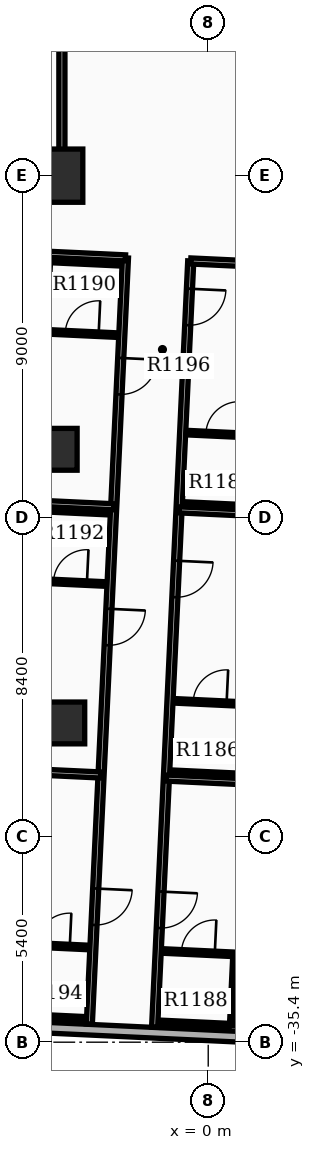
"""IFC4 building model, lengths in metres.
Left out: names, types, materials, properties, quantities, classifications, styles, units other than length and angle.
Written with IfcOpenShell. Run it as: python <this file> out.ifc"""

import sys

from ifc_helpers import new_model, si_unit, direction, frame, frame_2d, origin, origin_2d, place, context, subcontext, project, spatial, rectangle, extrude, element, fill, save


model = new_model("IFC4")
c1 = context("Model", 3, precision=1e-05, world=origin(), true_north=direction((0.0, 1.0)))
c2 = subcontext(c1, "Body", "Model", "MODEL_VIEW")
j1 = project(units=[si_unit("LENGTHUNIT", "METRE"), si_unit("PLANEANGLEUNIT", "RADIAN")], contexts=[c1])
p1 = place(None, origin())
s1 = spatial("IfcSite", under=j1, at=p1, CompositionType="ELEMENT")
p2 = place(p1, origin())
s2 = spatial("IfcBuilding", under=s1, at=p2, CompositionType="ELEMENT")
p3 = place(p2, frame((0.0, 0.0, 75.6)))
s3 = spatial("IfcBuildingStorey", under=s2, at=p3, CompositionType="ELEMENT", Elevation=75.6)
p4 = place(p3, frame((-4.0, -12.6, 0.0), z_axis=(0.0, 0.0, 1.0), x_axis=(1.0, 0.0, 0.0)))
e1 = element("IfcColumn", 1, at=p4, inside=s3, PredefinedType="COLUMN", context=c2, shape_type="SweptSolid", body=[
    extrude(rectangle(XDim=1.4, YDim=1.4, at=origin_2d()), origin(), (0.0, 0.0, 1.0), 3.9),
])
for number, where, z_axis, x_axis in (
    (2, (-4.0, -19.8, 0.0), (0.0, 0.0, 1.0), (1.0, 0.0, 0.0)),
    (3, (-3.8, -27.0, 0.0), (0.0, 0.0, 1.0), (1.0, 0.0, 0.0)),
):
    element("IfcColumn", number, at=place(p3, frame(where, z_axis=z_axis, x_axis=x_axis)), inside=s3, PredefinedType="COLUMN", context=c2, shape_type="SweptSolid", body=[
        extrude(rectangle(XDim=1.1, YDim=1.1, at=origin_2d()), origin(), (0.0, 0.0, 1.0), 3.9),
    ])
p5 = place(p3, frame((-8.51, -34.818, 0.0), z_axis=(0.0, 0.0, 1.0), x_axis=(0.998890092147, -0.047101845086, 0.0)))
e4 = element("IfcWall", 4, at=p5, inside=s3, PredefinedType="STANDARD", context=c2, shape_type="SweptSolid", body=[
    extrude(rectangle(XDim=13.72, YDim=0.28, at=frame_2d((6.86, 0.0))), origin(), (0.0, 0.0, 1.0), 2.91),
])
p6 = place(p5, frame((0.85, 0.0, 0.85)))
e5 = element("IfcOpeningElement", 5, at=p6, cuts=e4, PredefinedType="OPENING", context=c2, shape_type="SweptSolid", body=[
    extrude(rectangle(XDim=1.0, YDim=1.5, at=frame_2d((0.5, 0.75))), frame((0.0, 0.15, 0.0), z_axis=(0.0, -1.0, 0.0), x_axis=(1.0, 0.0, 0.0)), (0.0, 0.0, 1.0), 0.3),
])
p7 = place(p3, frame((-12.4, -13.15, 0.0), z_axis=(0.0, 0.0, 1.0), x_axis=(1.0, 0.0, 0.0)))
e6 = element("IfcWall", 6, at=p7, inside=s3, PredefinedType="PARTITIONING", context=c2, shape_type="SweptSolid", body=[
    extrude(rectangle(XDim=8.55, YDim=0.16, at=frame_2d((4.275, 0.0))), origin(), (0.0, 0.0, 1.0), 2.9),
])
p8 = place(p3, frame((-3.85, -13.065, 0.0), z_axis=(0.0, 0.0, 1.0), x_axis=(0.0, 1.0, 0.0)))
e7 = element("IfcWall", 7, at=p8, inside=s3, PredefinedType="PARTITIONING", context=c2, shape_type="SweptSolid", body=[
    extrude(rectangle(XDim=3.93, YDim=0.16, at=frame_2d((1.965, 0.0))), origin(), (0.0, 0.0, 1.0), 2.9),
])
p9 = place(p3, frame((-0.46, -14.845, 0.0), z_axis=(0.0, 0.0, 1.0), x_axis=(-0.047105352469, -0.998889926753, 0.0)))
e8 = element("IfcWall", 8, at=p9, inside=s3, PredefinedType="PARTITIONING", context=c2, shape_type="SweptSolid", body=[
    extrude(rectangle(XDim=20.182, YDim=0.16, at=frame_2d((10.091, 0.0))), origin(), (0.0, 0.0, 1.0), 2.9),
])
p10 = place(p9, frame((0.731, 0.0, 0.0)))
e9 = element("IfcOpeningElement", 9, at=p10, cuts=e8, PredefinedType="OPENING", context=c2, shape_type="SweptSolid", body=[
    extrude(rectangle(XDim=0.96, YDim=2.15, at=frame_2d((0.48, 1.075))), frame((0.0, 0.09, 0.0), z_axis=(0.0, -1.0, 0.0), x_axis=(1.0, 0.0, 0.0)), (0.0, 0.0, 1.0), 0.18),
])
p11 = place(p9, frame((7.896, 0.0, 0.0)))
e10 = element("IfcOpeningElement", 10, at=p11, cuts=e8, PredefinedType="OPENING", context=c2, shape_type="SweptSolid", body=[
    extrude(rectangle(XDim=0.96, YDim=2.15, at=frame_2d((0.48, 1.075))), frame((0.0, 0.09, 0.0), z_axis=(0.0, -1.0, 0.0), x_axis=(1.0, 0.0, 0.0)), (0.0, 0.0, 1.0), 0.18),
])
p12 = place(p9, frame((16.611, 0.0, 0.0)))
e11 = element("IfcOpeningElement", 11, at=p12, cuts=e8, PredefinedType="OPENING", context=c2, shape_type="SweptSolid", body=[
    extrude(rectangle(XDim=0.96, YDim=2.15, at=frame_2d((0.48, 1.075))), frame((0.0, 0.09, 0.0), z_axis=(0.0, -1.0, 0.0), x_axis=(1.0, 0.0, 0.0)), (0.0, 0.0, 1.0), 0.18),
])
p13 = place(p3, frame((-0.46, -14.845, 0.0), z_axis=(0.0, 0.0, 1.0), x_axis=(0.998888587821, -0.047133736548, 0.0)))
e12 = element("IfcWall", 12, at=p13, inside=s3, PredefinedType="PARTITIONING", context=c2, shape_type="SweptSolid", body=[
    extrude(rectangle(XDim=6.48, YDim=0.16, at=frame_2d((3.24, 0.0))), origin(), (0.0, 0.0, 1.0), 2.9),
])
p14 = place(p3, frame((-0.769, -21.394, 0.0), z_axis=(0.0, 0.0, 1.0), x_axis=(0.998889408842, -0.047116333717, 0.0)))
e13 = element("IfcWall", 13, at=p14, inside=s3, PredefinedType="PARTITIONING", context=c2, shape_type="SweptSolid", body=[
    extrude(rectangle(XDim=6.332, YDim=0.16, at=frame_2d((3.166, 0.0))), origin(), (0.0, 0.0, 1.0), 2.9),
])
p15 = place(p3, frame((-0.533, -19.362, 0.0), z_axis=(0.0, 0.0, 1.0), x_axis=(0.998891083954, -0.047080807099, 0.0)))
e14 = element("IfcWall", 14, at=p15, inside=s3, PredefinedType="PARTITIONING", context=c2, shape_type="SweptSolid", body=[
    extrude(rectangle(XDim=1.82, YDim=0.12, at=frame_2d((0.91, 0.0))), origin(), (0.0, 0.0, 1.0), 2.9),
])
p16 = place(p15, frame((0.47, 0.0, 0.0)))
e15 = element("IfcOpeningElement", 15, at=p16, cuts=e14, PredefinedType="OPENING", context=c2, shape_type="SweptSolid", body=[
    extrude(rectangle(XDim=0.88, YDim=2.1, at=frame_2d((0.44, 1.05))), frame((0.0, 0.07, 0.0), z_axis=(0.0, -1.0, 0.0), x_axis=(1.0, 0.0, 0.0)), (0.0, 0.0, 1.0), 0.14),
])
p17 = place(p3, frame((-0.621, -21.24, 0.0), z_axis=(0.0, 0.0, 1.0), x_axis=(0.998890786574, -0.047087116047, 0.0)))
e16 = element("IfcWall", 16, at=p17, inside=s3, PredefinedType="PARTITIONING", context=c2, shape_type="SweptSolid", body=[
    extrude(rectangle(XDim=1.82, YDim=0.12, at=frame_2d((0.91, 0.0))), origin(), (0.0, 0.0, 1.0), 2.9),
])
p18 = place(p3, frame((-1.101, -28.451, 0.0), z_axis=(0.0, 0.0, 1.0), x_axis=(0.99889113728, -0.047079675697, 0.0)))
e17 = element("IfcWall", 17, at=p18, inside=s3, PredefinedType="PARTITIONING", context=c2, shape_type="SweptSolid", body=[
    extrude(rectangle(XDim=6.332, YDim=0.16, at=frame_2d((3.166, 0.0))), origin(), (0.0, 0.0, 1.0), 2.9),
])
p19 = place(p3, frame((-0.865, -26.42, 0.0), z_axis=(0.0, 0.0, 1.0), x_axis=(0.998890786574, -0.047087116047, 0.0)))
e18 = element("IfcWall", 18, at=p19, inside=s3, PredefinedType="PARTITIONING", context=c2, shape_type="SweptSolid", body=[
    extrude(rectangle(XDim=1.82, YDim=0.12, at=frame_2d((0.91, 0.0))), origin(), (0.0, 0.0, 1.0), 2.9),
])
p20 = place(p19, frame((0.47, 0.0, 0.0)))
e19 = element("IfcOpeningElement", 19, at=p20, cuts=e18, PredefinedType="OPENING", context=c2, shape_type="SweptSolid", body=[
    extrude(rectangle(XDim=0.88, YDim=2.1, at=frame_2d((0.44, 1.05))), frame((0.0, 0.07, 0.0), z_axis=(0.0, -1.0, 0.0), x_axis=(1.0, 0.0, 0.0)), (0.0, 0.0, 1.0), 0.14),
])
p21 = place(p3, frame((-0.954, -28.298, 0.0), z_axis=(0.0, 0.0, 1.0), x_axis=(0.998891083954, -0.047080807099, 0.0)))
e20 = element("IfcWall", 20, at=p21, inside=s3, PredefinedType="PARTITIONING", context=c2, shape_type="SweptSolid", body=[
    extrude(rectangle(XDim=1.82, YDim=0.12, at=frame_2d((0.91, 0.0))), origin(), (0.0, 0.0, 1.0), 2.9),
])
p22 = place(p3, frame((-1.176, -33.001, 0.0), z_axis=(0.0, 0.0, 1.0), x_axis=(0.998890786574, -0.047087116047, 0.0)))
e21 = element("IfcWall", 21, at=p22, inside=s3, PredefinedType="PARTITIONING", context=c2, shape_type="SweptSolid", body=[
    extrude(rectangle(XDim=1.82, YDim=0.12, at=frame_2d((0.91, 0.0))), origin(), (0.0, 0.0, 1.0), 2.9),
])
p23 = place(p22, frame((0.47, 0.0, 0.0)))
e22 = element("IfcOpeningElement", 22, at=p23, cuts=e21, PredefinedType="OPENING", context=c2, shape_type="SweptSolid", body=[
    extrude(rectangle(XDim=0.88, YDim=2.1, at=frame_2d((0.44, 1.05))), frame((0.0, 0.07, 0.0), z_axis=(0.0, -1.0, 0.0), x_axis=(1.0, 0.0, 0.0)), (0.0, 0.0, 1.0), 0.14),
])
p24 = place(p3, frame((-1.264, -34.879, 0.0), z_axis=(0.0, 0.0, 1.0), x_axis=(0.998890786574, -0.047087116047, 0.0)))
e23 = element("IfcWall", 23, at=p24, inside=s3, PredefinedType="PARTITIONING", context=c2, shape_type="SweptSolid", body=[
    extrude(rectangle(XDim=1.82, YDim=0.12, at=frame_2d((0.91, 0.0))), origin(), (0.0, 0.0, 1.0), 2.9),
])
p25 = place(p3, frame((0.707, -33.09, 0.0), z_axis=(0.0, 0.0, 1.0), x_axis=(-0.047139425368, -0.998888319371, 0.0)))
e24 = element("IfcWall", 24, at=p25, inside=s3, PredefinedType="PARTITIONING", context=c2, shape_type="SweptSolid", body=[
    extrude(rectangle(XDim=1.88, YDim=0.12, at=frame_2d((0.94, 0.0))), origin(), (0.0, 0.0, 1.0), 2.9),
])
p26 = place(p3, frame((-2.178, -14.764, 0.0), z_axis=(0.0, 0.0, 1.0), x_axis=(-0.047105921672, -0.998889899911, 0.0)))
e25 = element("IfcWall", 25, at=p26, inside=s3, PredefinedType="PARTITIONING", context=c2, shape_type="SweptSolid", body=[
    extrude(rectangle(XDim=20.182, YDim=0.16, at=frame_2d((10.091, 0.0))), origin(), (0.0, 0.0, 1.0), 2.9),
])
p27 = place(p26, frame((2.636, 0.0, 0.0)))
e26 = element("IfcOpeningElement", 26, at=p27, cuts=e25, PredefinedType="OPENING", context=c2, shape_type="SweptSolid", body=[
    extrude(rectangle(XDim=0.96, YDim=2.15, at=frame_2d((0.48, 1.075))), frame((0.0, 0.09, 0.0), z_axis=(0.0, -1.0, 0.0), x_axis=(1.0, 0.0, 0.0)), (0.0, 0.0, 1.0), 0.18),
])
p28 = place(p26, frame((9.243, 0.0, 0.0)))
e27 = element("IfcOpeningElement", 27, at=p28, cuts=e25, PredefinedType="OPENING", context=c2, shape_type="SweptSolid", body=[
    extrude(rectangle(XDim=0.96, YDim=2.15, at=frame_2d((0.48, 1.075))), frame((0.0, 0.09, 0.0), z_axis=(0.0, -1.0, 0.0), x_axis=(1.0, 0.0, 0.0)), (0.0, 0.0, 1.0), 0.18),
])
p29 = place(p26, frame((16.611, 0.0, 0.0)))
e28 = element("IfcOpeningElement", 28, at=p29, cuts=e25, PredefinedType="OPENING", context=c2, shape_type="SweptSolid", body=[
    extrude(rectangle(XDim=0.96, YDim=2.15, at=frame_2d((0.48, 1.075))), frame((0.0, 0.09, 0.0), z_axis=(0.0, -1.0, 0.0), x_axis=(1.0, 0.0, 0.0)), (0.0, 0.0, 1.0), 0.18),
])
p30 = place(p3, frame((-2.178, -14.764, 0.0), z_axis=(0.0, 0.0, 1.0), x_axis=(-0.998889957338, 0.047104703898, 0.0)))
e29 = element("IfcWall", 29, at=p30, inside=s3, PredefinedType="PARTITIONING", context=c2, shape_type="SweptSolid", body=[
    extrude(rectangle(XDim=5.24, YDim=0.16, at=frame_2d((2.62, 0.0))), origin(), (0.0, 0.0, 1.0), 2.9),
])
p31 = place(p3, frame((-2.487, -21.312, 0.0), z_axis=(0.0, 0.0, 1.0), x_axis=(-0.998890911052, 0.047084475335, 0.0)))
e30 = element("IfcWall", 30, at=p31, inside=s3, PredefinedType="PARTITIONING", context=c2, shape_type="SweptSolid", body=[
    extrude(rectangle(XDim=5.092, YDim=0.16, at=frame_2d((2.546, 0.0))), origin(), (0.0, 0.0, 1.0), 2.9),
])
p32 = place(p3, frame((-4.232, -16.709, 0.0), z_axis=(0.0, 0.0, 1.0), x_axis=(0.998890786574, -0.047087116047, 0.0)))
e31 = element("IfcWall", 31, at=p32, inside=s3, PredefinedType="PARTITIONING", context=c2, shape_type="SweptSolid", body=[
    extrude(rectangle(XDim=1.82, YDim=0.12, at=frame_2d((0.91, 0.0))), origin(), (0.0, 0.0, 1.0), 2.9),
])
p33 = place(p32, frame((0.47, 0.0, 0.0)))
e32 = element("IfcOpeningElement", 32, at=p33, cuts=e31, PredefinedType="OPENING", context=c2, shape_type="SweptSolid", body=[
    extrude(rectangle(XDim=0.88, YDim=2.1, at=frame_2d((0.44, 1.05))), frame((0.0, 0.07, 0.0), z_axis=(0.0, -1.0, 0.0), x_axis=(1.0, 0.0, 0.0)), (0.0, 0.0, 1.0), 0.14),
])
p34 = place(p3, frame((-4.143, -14.831, 0.0), z_axis=(0.0, 0.0, 1.0), x_axis=(0.998891083954, -0.047080807099, 0.0)))
e33 = element("IfcWall", 33, at=p34, inside=s3, PredefinedType="PARTITIONING", context=c2, shape_type="SweptSolid", body=[
    extrude(rectangle(XDim=1.82, YDim=0.12, at=frame_2d((0.91, 0.0))), origin(), (0.0, 0.0, 1.0), 2.9),
])
p35 = place(p3, frame((-2.82, -28.37, 0.0), z_axis=(0.0, 0.0, 1.0), x_axis=(-0.998890911052, 0.047084475335, 0.0)))
e34 = element("IfcWall", 34, at=p35, inside=s3, PredefinedType="PARTITIONING", context=c2, shape_type="SweptSolid", body=[
    extrude(rectangle(XDim=5.092, YDim=0.16, at=frame_2d((2.546, 0.0))), origin(), (0.0, 0.0, 1.0), 2.9),
])
p36 = place(p3, frame((-4.541, -23.258, 0.0), z_axis=(0.0, 0.0, 1.0), x_axis=(0.998884467853, -0.047220968666, 0.0)))
e35 = element("IfcWall", 35, at=p36, inside=s3, PredefinedType="PARTITIONING", context=c2, shape_type="SweptSolid", body=[
    extrude(rectangle(XDim=1.82, YDim=0.12, at=frame_2d((0.91, 0.0))), origin(), (0.0, 0.0, 1.0), 2.9),
])
p37 = place(p36, frame((0.47, 0.0, 0.0)))
e36 = element("IfcOpeningElement", 36, at=p37, cuts=e35, PredefinedType="OPENING", context=c2, shape_type="SweptSolid", body=[
    extrude(rectangle(XDim=0.88, YDim=2.1, at=frame_2d((0.44, 1.05))), frame((0.0, 0.07, 0.0), z_axis=(0.0, -1.0, 0.0), x_axis=(1.0, 0.0, 0.0)), (0.0, 0.0, 1.0), 0.14),
])
p38 = place(p3, frame((-4.452, -21.38, 0.0), z_axis=(0.0, 0.0, 1.0), x_axis=(0.998884766924, -0.047214641863, 0.0)))
e37 = element("IfcWall", 37, at=p38, inside=s3, PredefinedType="PARTITIONING", context=c2, shape_type="SweptSolid", body=[
    extrude(rectangle(XDim=1.82, YDim=0.12, at=frame_2d((0.91, 0.0))), origin(), (0.0, 0.0, 1.0), 2.9),
])
p39 = place(p3, frame((-4.992, -32.821, 0.0), z_axis=(0.0, 0.0, 1.0), x_axis=(0.998891083954, -0.047080807099, 0.0)))
e38 = element("IfcWall", 38, at=p39, inside=s3, PredefinedType="PARTITIONING", context=c2, shape_type="SweptSolid", body=[
    extrude(rectangle(XDim=1.82, YDim=0.12, at=frame_2d((0.91, 0.0))), origin(), (0.0, 0.0, 1.0), 2.9),
])
p40 = place(p39, frame((0.47, 0.0, 0.0)))
e39 = element("IfcOpeningElement", 39, at=p40, cuts=e38, PredefinedType="OPENING", context=c2, shape_type="SweptSolid", body=[
    extrude(rectangle(XDim=0.88, YDim=2.1, at=frame_2d((0.44, 1.05))), frame((0.0, 0.07, 0.0), z_axis=(0.0, -1.0, 0.0), x_axis=(1.0, 0.0, 0.0)), (0.0, 0.0, 1.0), 0.14),
])
p41 = place(p3, frame((-5.08, -34.699, 0.0), z_axis=(0.0, 0.0, 1.0), x_axis=(0.998890786574, -0.047087116047, 0.0)))
e40 = element("IfcWall", 40, at=p41, inside=s3, PredefinedType="PARTITIONING", context=c2, shape_type="SweptSolid", body=[
    extrude(rectangle(XDim=1.82, YDim=0.12, at=frame_2d((0.91, 0.0))), origin(), (0.0, 0.0, 1.0), 2.9),
])
p42 = place(p10, origin())
e41 = element("IfcDoor", 41, at=p42, inside=s3, OperationType="SINGLE_SWING_LEFT", PredefinedType="DOOR", context=c2, shape_type="SweptSolid", body=[
    extrude(rectangle(XDim=0.96, YDim=2.15, at=frame_2d((0.48, 1.075))), frame((0.0, 0.025, 0.0), z_axis=(0.0, -1.0, 0.0), x_axis=(1.0, 0.0, 0.0)), (0.0, 0.0, 1.0), 0.05),
])
fill(e9, e41)
p43 = place(p16, origin())
e42 = element("IfcDoor", 42, at=p43, inside=s3, OperationType="SINGLE_SWING_RIGHT", PredefinedType="DOOR", context=c2, shape_type="SweptSolid", body=[
    extrude(rectangle(XDim=0.88, YDim=2.1, at=frame_2d((0.44, 1.05))), frame((0.0, 0.025, 0.0), z_axis=(0.0, -1.0, 0.0), x_axis=(1.0, 0.0, 0.0)), (0.0, 0.0, 1.0), 0.05),
])
fill(e15, e42)
p44 = place(p11, origin())
e43 = element("IfcDoor", 43, at=p44, inside=s3, OperationType="SINGLE_SWING_LEFT", PredefinedType="DOOR", context=c2, shape_type="SweptSolid", body=[
    extrude(rectangle(XDim=0.96, YDim=2.15, at=frame_2d((0.48, 1.075))), frame((0.0, 0.025, 0.0), z_axis=(0.0, -1.0, 0.0), x_axis=(1.0, 0.0, 0.0)), (0.0, 0.0, 1.0), 0.05),
])
fill(e10, e43)
p45 = place(p20, origin())
e44 = element("IfcDoor", 44, at=p45, inside=s3, OperationType="SINGLE_SWING_RIGHT", PredefinedType="DOOR", context=c2, shape_type="SweptSolid", body=[
    extrude(rectangle(XDim=0.88, YDim=2.1, at=frame_2d((0.44, 1.05))), frame((0.0, 0.025, 0.0), z_axis=(0.0, -1.0, 0.0), x_axis=(1.0, 0.0, 0.0)), (0.0, 0.0, 1.0), 0.05),
])
fill(e19, e44)
p46 = place(p12, origin())
e45 = element("IfcDoor", 45, at=p46, inside=s3, OperationType="SINGLE_SWING_LEFT", PredefinedType="DOOR", context=c2, shape_type="SweptSolid", body=[
    extrude(rectangle(XDim=0.96, YDim=2.15, at=frame_2d((0.48, 1.075))), frame((0.0, 0.025, 0.0), z_axis=(0.0, -1.0, 0.0), x_axis=(1.0, 0.0, 0.0)), (0.0, 0.0, 1.0), 0.05),
])
fill(e11, e45)
p47 = place(p23, origin())
e46 = element("IfcDoor", 46, at=p47, inside=s3, OperationType="SINGLE_SWING_RIGHT", PredefinedType="DOOR", context=c2, shape_type="SweptSolid", body=[
    extrude(rectangle(XDim=0.88, YDim=2.1, at=frame_2d((0.44, 1.05))), frame((0.0, 0.025, 0.0), z_axis=(0.0, -1.0, 0.0), x_axis=(1.0, 0.0, 0.0)), (0.0, 0.0, 1.0), 0.05),
])
fill(e22, e46)
p48 = place(p27, origin())
e47 = element("IfcDoor", 47, at=p48, inside=s3, OperationType="SINGLE_SWING_LEFT", PredefinedType="DOOR", context=c2, shape_type="SweptSolid", body=[
    extrude(rectangle(XDim=0.96, YDim=2.15, at=frame_2d((0.48, 1.075))), frame((0.0, 0.025, 0.0), z_axis=(0.0, -1.0, 0.0), x_axis=(1.0, 0.0, 0.0)), (0.0, 0.0, 1.0), 0.05),
])
fill(e26, e47)
p49 = place(p33, origin())
e48 = element("IfcDoor", 48, at=p49, inside=s3, OperationType="SINGLE_SWING_RIGHT", PredefinedType="DOOR", context=c2, shape_type="SweptSolid", body=[
    extrude(rectangle(XDim=0.88, YDim=2.1, at=frame_2d((0.44, 1.05))), frame((0.0, 0.025, 0.0), z_axis=(0.0, -1.0, 0.0), x_axis=(1.0, 0.0, 0.0)), (0.0, 0.0, 1.0), 0.05),
])
fill(e32, e48)
p50 = place(p28, origin())
e49 = element("IfcDoor", 49, at=p50, inside=s3, OperationType="SINGLE_SWING_LEFT", PredefinedType="DOOR", context=c2, shape_type="SweptSolid", body=[
    extrude(rectangle(XDim=0.96, YDim=2.15, at=frame_2d((0.48, 1.075))), frame((0.0, 0.025, 0.0), z_axis=(0.0, -1.0, 0.0), x_axis=(1.0, 0.0, 0.0)), (0.0, 0.0, 1.0), 0.05),
])
fill(e27, e49)
p51 = place(p37, origin())
e50 = element("IfcDoor", 50, at=p51, inside=s3, OperationType="SINGLE_SWING_RIGHT", PredefinedType="DOOR", context=c2, shape_type="SweptSolid", body=[
    extrude(rectangle(XDim=0.88, YDim=2.1, at=frame_2d((0.44, 1.05))), frame((0.0, 0.025, 0.0), z_axis=(0.0, -1.0, 0.0), x_axis=(1.0, 0.0, 0.0)), (0.0, 0.0, 1.0), 0.05),
])
fill(e36, e50)
p52 = place(p29, origin())
e51 = element("IfcDoor", 51, at=p52, inside=s3, OperationType="SINGLE_SWING_LEFT", PredefinedType="DOOR", context=c2, shape_type="SweptSolid", body=[
    extrude(rectangle(XDim=0.96, YDim=2.15, at=frame_2d((0.48, 1.075))), frame((0.0, 0.025, 0.0), z_axis=(0.0, -1.0, 0.0), x_axis=(1.0, 0.0, 0.0)), (0.0, 0.0, 1.0), 0.05),
])
fill(e28, e51)
p53 = place(p40, origin())
e52 = element("IfcDoor", 52, at=p53, inside=s3, OperationType="SINGLE_SWING_RIGHT", PredefinedType="DOOR", context=c2, shape_type="SweptSolid", body=[
    extrude(rectangle(XDim=0.88, YDim=2.1, at=frame_2d((0.44, 1.05))), frame((0.0, 0.025, 0.0), z_axis=(0.0, -1.0, 0.0), x_axis=(1.0, 0.0, 0.0)), (0.0, 0.0, 1.0), 0.05),
])
fill(e39, e52)
save(model, sys.argv[1])
